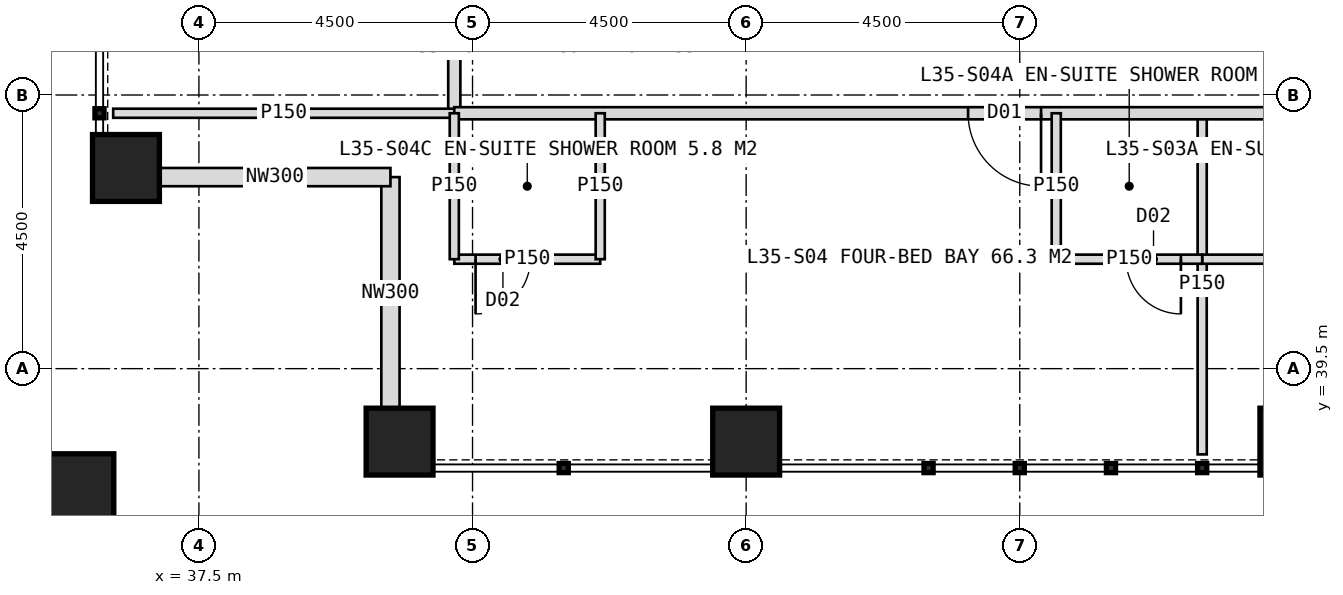
"""IFC4 building model, lengths in metres.
Left out: names, types, materials, properties, quantities, classifications, styles, units other than length and angle.
Written with IfcOpenShell. Run it as: python <this file> out.ifc"""

import sys

from ifc_helpers import new_model, si_unit, direction, frame, frame_2d, origin, origin_2d, place, context, subcontext, project, spatial, rectangle, hollow_rectangle, extrude, element, fill, save


model = new_model("IFC4")
c1 = context("Model", 3, precision=1e-05, world=origin(), true_north=direction((0.0, 1.0)))
c2 = subcontext(c1, "Body", "Model", "MODEL_VIEW")
j1 = project(units=[si_unit("LENGTHUNIT", "METRE"), si_unit("PLANEANGLEUNIT", "RADIAN")], contexts=[c1])
p1 = place(None, origin())
s1 = spatial("IfcSite", under=j1, at=p1, CompositionType="ELEMENT")
p2 = place(p1, origin())
s2 = spatial("IfcBuilding", under=s1, at=p2, CompositionType="ELEMENT")
p3 = place(p2, frame((0.0, 0.0, 148.0)))
s3 = spatial("IfcBuildingStorey", under=s2, at=p3, CompositionType="ELEMENT", Elevation=148.0)
for number, where, z_axis, x_axis in (
    (1, (40.8, 38.3, 0.0), (0.0, 0.0, 1.0), (1.0, 0.0, 0.0)),
    (2, (36.3, 42.8, 0.0), (0.0, 0.0, 1.0), (1.0, 0.0, 0.0)),
    (3, (46.5, 38.3, 0.0), (0.0, 0.0, 1.0), (1.0, 0.0, 0.0)),
    (4, (55.5, 38.3, 0.0), (0.0, 0.0, 1.0), (1.0, 0.0, 0.0)),
):
    element("IfcColumn", number, at=place(p3, frame(where, z_axis=z_axis, x_axis=x_axis)), inside=s3, PredefinedType="COLUMN", context=c2, shape_type="SweptSolid", body=[
        extrude(hollow_rectangle(XDim=1.1, YDim=1.1, WallThickness=0.1, at=origin_2d()), origin(), (0.0, 0.0, 1.0), 4.0),
    ])
p4 = place(p3, frame((35.4, 37.4, 0.0), z_axis=(0.0, 0.0, 1.0), x_axis=(1.0, 0.0, 0.0)))
e5 = element("IfcColumn", 5, at=p4, inside=s3, PredefinedType="COLUMN", context=c2, shape_type="SweptSolid", body=[
    extrude(hollow_rectangle(XDim=1.4, YDim=1.4, WallThickness=0.08, at=origin_2d()), origin(), (0.0, 0.0, 1.0), 4.0),
])
for number, where, z_axis, x_axis in (
    (6, (40.65, 38.85, 0.0), (0.0, 0.0, 1.0), (0.0, 1.0, 0.0)),
    (7, (40.65, 42.65, 0.0), (0.0, 0.0, 1.0), (-1.0, 0.0, 0.0)),
):
    element("IfcWall", number, at=place(p3, frame(where, z_axis=z_axis, x_axis=x_axis)), inside=s3, PredefinedType="ELEMENTEDWALL", context=c2, shape_type="SweptSolid", body=[
        extrude(rectangle(XDim=3.8, YDim=0.3, at=frame_2d((1.9, 0.0))), origin(), (0.0, 0.0, 1.0), 4.0),
    ])
p5 = place(p3, frame((41.7, 43.7, 0.0), z_axis=(0.0, 0.0, 1.0), x_axis=(0.0, 1.0, 0.0)))
e8 = element("IfcWall", 8, at=p5, inside=s3, PredefinedType="PARTITIONING", context=c2, shape_type="SweptSolid", body=[
    extrude(rectangle(XDim=36.6, YDim=0.2, at=frame_2d((18.3, 0.0))), origin(), (0.0, 0.0, 1.0), 3.75),
])
p6 = place(p5, frame((3.35, 0.0, 0.0)))
e9 = element("IfcOpeningElement", 9, at=p6, cuts=e8, PredefinedType="OPENING", context=c2, shape_type="SweptSolid", body=[
    extrude(rectangle(XDim=1.2, YDim=2.2, at=frame_2d((0.6, 1.1))), frame((0.0, 0.11, 0.0), z_axis=(0.0, -1.0, 0.0), x_axis=(1.0, 0.0, 0.0)), (0.0, 0.0, 1.0), 0.22),
])
p7 = place(p5, frame((11.05, 0.0, 0.0)))
e10 = element("IfcOpeningElement", 10, at=p7, cuts=e8, PredefinedType="OPENING", context=c2, shape_type="SweptSolid", body=[
    extrude(rectangle(XDim=1.2, YDim=2.2, at=frame_2d((0.6, 1.1))), frame((0.0, 0.11, 0.0), z_axis=(0.0, -1.0, 0.0), x_axis=(1.0, 0.0, 0.0)), (0.0, 0.0, 1.0), 0.22),
])
p8 = place(p5, frame((16.3, 0.0, 0.0)))
e11 = element("IfcOpeningElement", 11, at=p8, cuts=e8, PredefinedType="OPENING", context=c2, shape_type="SweptSolid", body=[
    extrude(rectangle(XDim=1.0, YDim=2.1, at=frame_2d((0.5, 1.05))), frame((0.0, 0.11, 0.0), z_axis=(0.0, -1.0, 0.0), x_axis=(1.0, 0.0, 0.0)), (0.0, 0.0, 1.0), 0.22),
])
p9 = place(p5, frame((20.95, 0.0, 0.0)))
e12 = element("IfcOpeningElement", 12, at=p9, cuts=e8, PredefinedType="OPENING", context=c2, shape_type="SweptSolid", body=[
    extrude(rectangle(XDim=1.2, YDim=2.2, at=frame_2d((0.6, 1.1))), frame((0.0, 0.11, 0.0), z_axis=(0.0, -1.0, 0.0), x_axis=(1.0, 0.0, 0.0)), (0.0, 0.0, 1.0), 0.22),
])
p10 = place(p5, frame((32.75, 0.0, 0.0)))
e13 = element("IfcOpeningElement", 13, at=p10, cuts=e8, PredefinedType="OPENING", context=c2, shape_type="SweptSolid", body=[
    extrude(rectangle(XDim=1.2, YDim=2.2, at=frame_2d((0.6, 1.1))), frame((0.0, 0.11, 0.0), z_axis=(0.0, -1.0, 0.0), x_axis=(1.0, 0.0, 0.0)), (0.0, 0.0, 1.0), 0.22),
])
for number, where, z_axis, x_axis in (
    (14, (41.7, 43.7, 0.0), (0.0, 0.0, 1.0), (-1.0, 0.0, 0.0)),
    (15, (54.0, 43.7, 0.0), (0.0, 0.0, 1.0), (0.0, -1.0, 0.0)),
):
    element("IfcWall", number, at=place(p3, frame(where, z_axis=z_axis, x_axis=x_axis)), inside=s3, PredefinedType="PARTITIONING", context=c2, shape_type="SweptSolid", body=[
        extrude(rectangle(XDim=5.61, YDim=0.15, at=frame_2d((2.805, 0.0))), origin(), (0.0, 0.0, 1.0), 3.75),
    ])
p11 = place(p3, frame((78.3, 43.7, 0.0), z_axis=(0.0, 0.0, 1.0), x_axis=(-1.0, 0.0, 0.0)))
e16 = element("IfcWall", 16, at=p11, inside=s3, PredefinedType="PARTITIONING", context=c2, shape_type="SweptSolid", body=[
    extrude(rectangle(XDim=36.6, YDim=0.2, at=frame_2d((18.3, 0.0))), origin(), (0.0, 0.0, 1.0), 3.75),
])
p12 = place(p11, frame((3.35, 0.0, 0.0)))
e17 = element("IfcOpeningElement", 17, at=p12, cuts=e16, PredefinedType="OPENING", context=c2, shape_type="SweptSolid", body=[
    extrude(rectangle(XDim=1.2, YDim=2.2, at=frame_2d((0.6, 1.1))), frame((0.0, 0.11, 0.0), z_axis=(0.0, -1.0, 0.0), x_axis=(1.0, 0.0, 0.0)), (0.0, 0.0, 1.0), 0.22),
])
p13 = place(p11, frame((11.05, 0.0, 0.0)))
e18 = element("IfcOpeningElement", 18, at=p13, cuts=e16, PredefinedType="OPENING", context=c2, shape_type="SweptSolid", body=[
    extrude(rectangle(XDim=1.2, YDim=2.2, at=frame_2d((0.6, 1.1))), frame((0.0, 0.11, 0.0), z_axis=(0.0, -1.0, 0.0), x_axis=(1.0, 0.0, 0.0)), (0.0, 0.0, 1.0), 0.22),
])
p14 = place(p11, frame((19.85, 0.0, 0.0)))
e19 = element("IfcOpeningElement", 19, at=p14, cuts=e16, PredefinedType="OPENING", context=c2, shape_type="SweptSolid", body=[
    extrude(rectangle(XDim=1.2, YDim=2.2, at=frame_2d((0.6, 1.1))), frame((0.0, 0.11, 0.0), z_axis=(0.0, -1.0, 0.0), x_axis=(1.0, 0.0, 0.0)), (0.0, 0.0, 1.0), 0.22),
])
p15 = place(p11, frame((26.95, 0.0, 0.0)))
e20 = element("IfcOpeningElement", 20, at=p15, cuts=e16, PredefinedType="OPENING", context=c2, shape_type="SweptSolid", body=[
    extrude(rectangle(XDim=1.2, YDim=2.2, at=frame_2d((0.6, 1.1))), frame((0.0, 0.11, 0.0), z_axis=(0.0, -1.0, 0.0), x_axis=(1.0, 0.0, 0.0)), (0.0, 0.0, 1.0), 0.22),
])
p16 = place(p3, frame((57.0, 41.3, 0.0), z_axis=(0.0, 0.0, 1.0), x_axis=(-1.0, 0.0, 0.0)))
e21 = element("IfcWall", 21, at=p16, inside=s3, PredefinedType="PARTITIONING", context=c2, shape_type="SweptSolid", body=[
    extrude(rectangle(XDim=3.0, YDim=0.15, at=frame_2d((1.5, 0.0))), origin(), (0.0, 0.0, 1.0), 3.75),
])
p17 = place(p16, frame((0.35, 0.0, 0.0)))
e22 = element("IfcOpeningElement", 22, at=p17, cuts=e21, PredefinedType="OPENING", context=c2, shape_type="SweptSolid", body=[
    extrude(rectangle(XDim=0.9, YDim=2.1, at=frame_2d((0.45, 1.05))), frame((0.0, 0.085, 0.0), z_axis=(0.0, -1.0, 0.0), x_axis=(1.0, 0.0, 0.0)), (0.0, 0.0, 1.0), 0.17),
])
p18 = place(p3, frame((54.0, 41.3, 0.0), z_axis=(0.0, 0.0, 1.0), x_axis=(-1.0, 0.0, 0.0)))
e23 = element("IfcWall", 23, at=p18, inside=s3, PredefinedType="PARTITIONING", context=c2, shape_type="SweptSolid", body=[
    extrude(rectangle(XDim=2.4, YDim=0.15, at=frame_2d((1.2, 0.0))), origin(), (0.0, 0.0, 1.0), 3.75),
])
p19 = place(p18, frame((0.35, 0.0, 0.0)))
e24 = element("IfcOpeningElement", 24, at=p19, cuts=e23, PredefinedType="OPENING", context=c2, shape_type="SweptSolid", body=[
    extrude(rectangle(XDim=0.9, YDim=2.1, at=frame_2d((0.45, 1.05))), frame((0.0, 0.085, 0.0), z_axis=(0.0, -1.0, 0.0), x_axis=(1.0, 0.0, 0.0)), (0.0, 0.0, 1.0), 0.17),
])
p20 = place(p3, frame((51.6, 43.7, 0.0), z_axis=(0.0, 0.0, 1.0), x_axis=(0.0, -1.0, 0.0)))
e25 = element("IfcWall", 25, at=p20, inside=s3, PredefinedType="PARTITIONING", context=c2, shape_type="SweptSolid", body=[
    extrude(rectangle(XDim=2.4, YDim=0.15, at=frame_2d((1.2, 0.0))), origin(), (0.0, 0.0, 1.0), 3.75),
])
p21 = place(p3, frame((44.1, 41.3, 0.0), z_axis=(0.0, 0.0, 1.0), x_axis=(-1.0, 0.0, 0.0)))
e26 = element("IfcWall", 26, at=p21, inside=s3, PredefinedType="PARTITIONING", context=c2, shape_type="SweptSolid", body=[
    extrude(rectangle(XDim=2.4, YDim=0.15, at=frame_2d((1.2, 0.0))), origin(), (0.0, 0.0, 1.0), 3.75),
])
p22 = place(p21, frame((1.15, 0.0, 0.0)))
e27 = element("IfcOpeningElement", 27, at=p22, cuts=e26, PredefinedType="OPENING", context=c2, shape_type="SweptSolid", body=[
    extrude(rectangle(XDim=0.9, YDim=2.1, at=frame_2d((0.45, 1.05))), frame((0.0, 0.085, 0.0), z_axis=(0.0, -1.0, 0.0), x_axis=(1.0, 0.0, 0.0)), (0.0, 0.0, 1.0), 0.17),
])
for number, where, z_axis, x_axis in (
    (28, (44.1, 43.7, 0.0), (0.0, 0.0, 1.0), (0.0, -1.0, 0.0)),
    (29, (41.7, 43.7, 0.0), (0.0, 0.0, 1.0), (0.0, -1.0, 0.0)),
):
    element("IfcWall", number, at=place(p3, frame(where, z_axis=z_axis, x_axis=x_axis)), inside=s3, PredefinedType="PARTITIONING", context=c2, shape_type="SweptSolid", body=[
        extrude(rectangle(XDim=2.4, YDim=0.15, at=frame_2d((1.2, 0.0))), origin(), (0.0, 0.0, 1.0), 3.75),
    ])
p23 = place(p15, origin())
e30 = element("IfcDoor", 30, at=p23, inside=s3, OperationType="SINGLE_SWING_LEFT", PredefinedType="DOOR", context=c2, shape_type="SweptSolid", body=[
    extrude(rectangle(XDim=1.2, YDim=2.2, at=frame_2d((0.6, 1.1))), frame((0.0, 0.025, 0.0), z_axis=(0.0, -1.0, 0.0), x_axis=(1.0, 0.0, 0.0)), (0.0, 0.0, 1.0), 0.05),
])
fill(e20, e30)
p24 = place(p19, origin())
e31 = element("IfcDoor", 31, at=p24, inside=s3, OperationType="SINGLE_SWING_LEFT", PredefinedType="DOOR", context=c2, shape_type="SweptSolid", body=[
    extrude(rectangle(XDim=0.9, YDim=2.1, at=frame_2d((0.45, 1.05))), frame((0.0, 0.025, 0.0), z_axis=(0.0, -1.0, 0.0), x_axis=(1.0, 0.0, 0.0)), (0.0, 0.0, 1.0), 0.05),
])
fill(e24, e31)
p25 = place(p22, origin())
e32 = element("IfcDoor", 32, at=p25, inside=s3, OperationType="SINGLE_SWING_RIGHT", PredefinedType="DOOR", context=c2, shape_type="SweptSolid", body=[
    extrude(rectangle(XDim=0.9, YDim=2.1, at=frame_2d((0.45, 1.05))), frame((0.0, 0.025, 0.0), z_axis=(0.0, -1.0, 0.0), x_axis=(1.0, 0.0, 0.0)), (0.0, 0.0, 1.0), 0.05),
])
fill(e27, e32)
save(model, sys.argv[1])
